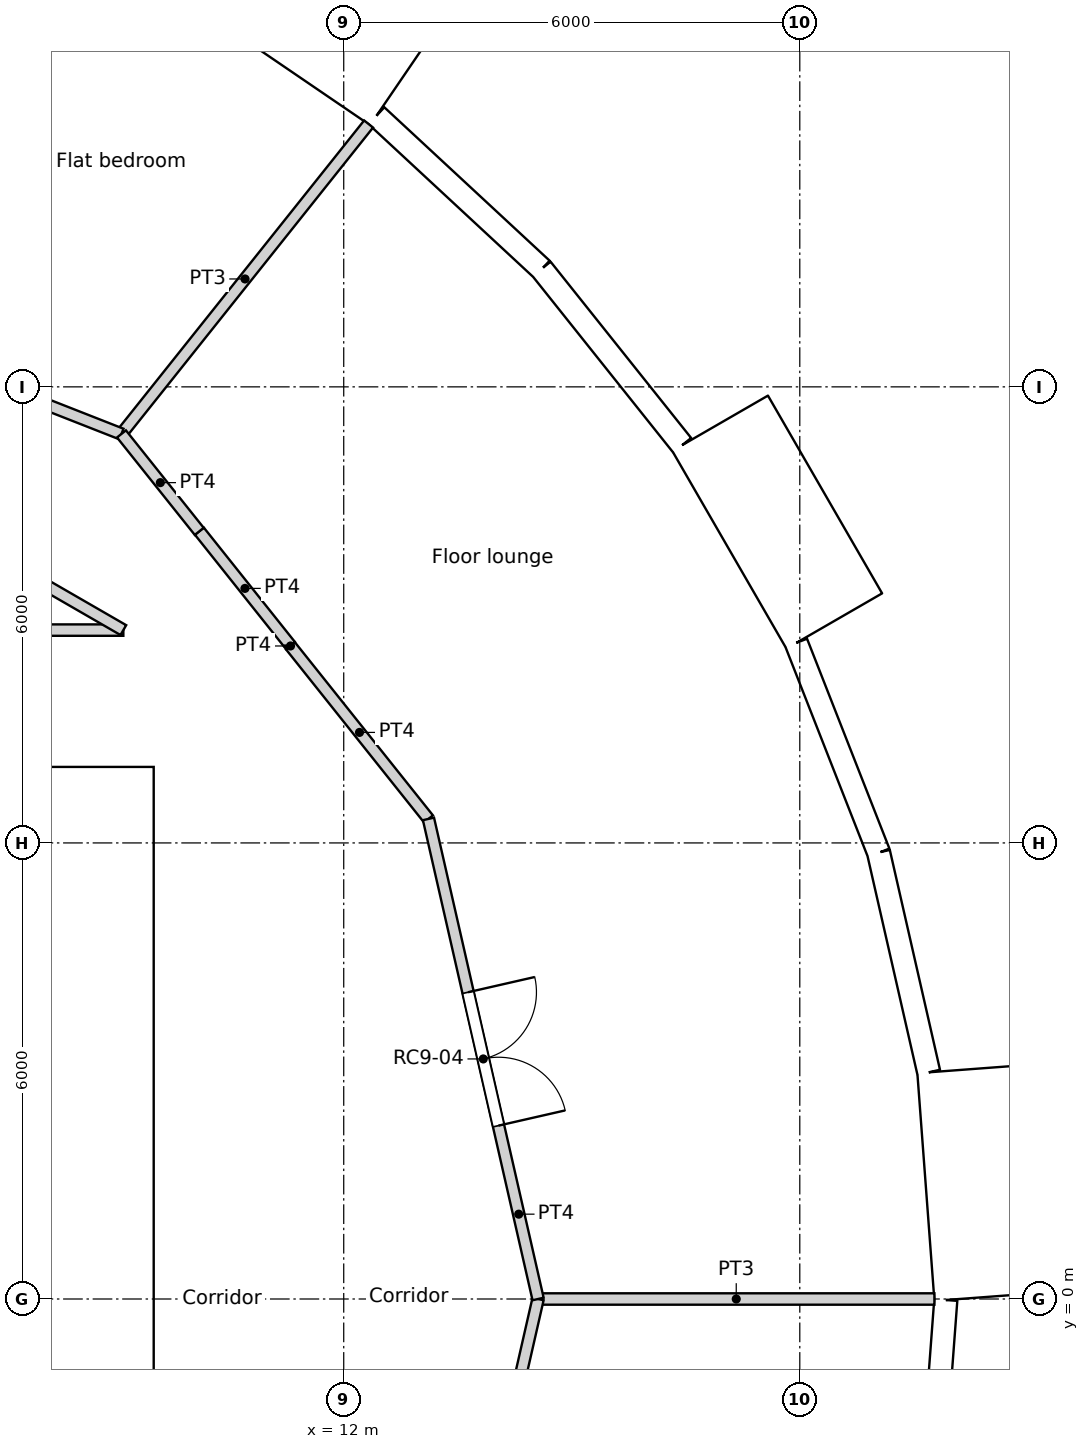
"""IFC4 building model, lengths in metres.
Left out: names, types, materials, properties, quantities, classifications, styles, units other than length and angle.
Written with IfcOpenShell. Run it as: python <this file> out.ifc"""

import sys

from ifc_helpers import new_model, si_unit, direction, frame, frame_2d, origin, origin_2d, place, context, subcontext, project, spatial, rectangle, circle, extrude, element, fill, save


model = new_model("IFC4")
c1 = context("Model", 3, precision=1e-05, world=origin(), true_north=direction((0.0, 1.0)))
c2 = subcontext(c1, "Body", "Model", "MODEL_VIEW")
j1 = project(units=[si_unit("LENGTHUNIT", "METRE"), si_unit("PLANEANGLEUNIT", "RADIAN")], contexts=[c1])
p1 = place(None, origin())
s1 = spatial("IfcSite", under=j1, at=p1, CompositionType="ELEMENT")
p2 = place(p1, origin())
s2 = spatial("IfcBuilding", under=s1, at=p2, CompositionType="ELEMENT")
p3 = place(p2, frame((0.0, 0.0, 316.2)))
s3 = spatial("IfcBuildingStorey", under=s2, at=p3, CompositionType="ELEMENT", Elevation=316.2)
for number, where, z_axis, x_axis in (
    (1, (18.822, 0.0, 0.0), (0.0, 0.0, 1.0), (1.0, 0.0, 0.0)),
    (2, (17.986, 5.548, 0.0), (0.0, 0.0, 1.0), (1.0, 0.0, 0.0)),
    (3, (15.552, 10.603, 0.0), (0.0, 0.0, 1.0), (1.0, 0.0, 0.0)),
    (4, (11.735, 14.716, 0.0), (0.0, 0.0, 1.0), (1.0, 0.0, 0.0)),
):
    element("IfcColumn", number, at=place(p3, frame(where, z_axis=z_axis, x_axis=x_axis)), inside=s3, PredefinedType="COLUMN", context=c2, shape_type="SweptSolid", body=[
        extrude(circle(Radius=0.45, at=origin_2d()), origin(), (0.0, 0.0, 1.0), 3.6),
    ])
p4 = place(p3, frame((20.496, 0.032, -0.35), z_axis=(0.0, 0.0, 1.0), x_axis=(-0.074785902127, 0.997199613339, 0.0)))
e5 = element("IfcWall", 5, at=p4, inside=s3, PredefinedType="ELEMENTEDWALL", context=c2, shape_type="SweptSolid", body=[
    extrude(rectangle(XDim=3.0, YDim=1.45, at=frame_2d((1.5, 0.0))), origin(), (0.0, 0.0, 1.0), 3.6),
])
p5 = place(p4, frame((1.5, 0.0, 1.9)))
e6 = element("IfcOpeningElement", 6, at=p5, cuts=e5, PredefinedType="OPENING", context=c2, shape_type="SweptSolid", body=[
    extrude(circle(Radius=0.9, at=origin_2d()), frame((0.0, 0.735, 0.0), z_axis=(0.0, -1.0, 0.0), x_axis=(1.0, 0.0, 0.0)), (0.0, 0.0, 1.0), 1.47),
])
p6 = place(p3, frame((19.696, 2.984, 0.0), z_axis=(0.0, 0.0, 1.0), x_axis=(-0.222529389789, 0.974925982155, 0.0)))
e7 = element("IfcWall", 7, at=p6, inside=s3, PredefinedType="SOLIDWALL", context=c2, shape_type="SweptSolid", body=[
    extrude(rectangle(XDim=2.962, YDim=0.3, at=frame_2d((1.481, 0.0))), origin(), (0.0, 0.0, 1.0), 3.25),
])
p7 = place(p6, frame((1.481, 0.0, 1.55)))
e8 = element("IfcOpeningElement", 8, at=p7, cuts=e7, PredefinedType="OPENING", context=c2, shape_type="SweptSolid", body=[
    extrude(circle(Radius=0.9, at=origin_2d()), frame((0.0, 0.16, 0.0), z_axis=(0.0, -1.0, 0.0), x_axis=(1.0, 0.0, 0.0)), (0.0, 0.0, 1.0), 0.32),
])
p8 = place(p3, frame((19.037, 5.872, 0.0), z_axis=(0.0, 0.0, 1.0), x_axis=(-0.36530043032, 0.930889679612, 0.0)))
e9 = element("IfcWall", 9, at=p8, inside=s3, PredefinedType="SOLIDWALL", context=c2, shape_type="SweptSolid", body=[
    extrude(rectangle(XDim=2.962, YDim=0.3, at=frame_2d((1.481, 0.0))), origin(), (0.0, 0.0, 1.0), 3.25),
])
p9 = place(p8, frame((1.481, 0.0, 1.55)))
e10 = element("IfcOpeningElement", 10, at=p9, cuts=e9, PredefinedType="OPENING", context=c2, shape_type="SweptSolid", body=[
    extrude(circle(Radius=0.9, at=origin_2d()), frame((0.0, 0.16, 0.0), z_axis=(0.0, -1.0, 0.0), x_axis=(1.0, 0.0, 0.0)), (0.0, 0.0, 1.0), 0.32),
])
p10 = place(p3, frame((18.452, 8.921, -0.35), z_axis=(0.0, 0.0, 1.0), x_axis=(-0.499990139034, 0.866031096941, 0.0)))
e11 = element("IfcWall", 11, at=p10, inside=s3, PredefinedType="ELEMENTEDWALL", context=c2, shape_type="SweptSolid", body=[
    extrude(rectangle(XDim=3.0, YDim=1.45, at=frame_2d((1.5, 0.0))), origin(), (0.0, 0.0, 1.0), 3.6),
])
p11 = place(p10, frame((1.5, 0.0, 1.9)))
e12 = element("IfcOpeningElement", 12, at=p11, cuts=e11, PredefinedType="OPENING", context=c2, shape_type="SweptSolid", body=[
    extrude(circle(Radius=0.9, at=origin_2d()), frame((0.0, 0.735, 0.0), z_axis=(0.0, -1.0, 0.0), x_axis=(1.0, 0.0, 0.0)), (0.0, 0.0, 1.0), 1.47),
])
p12 = place(p3, frame((16.451, 11.234, 0.0), z_axis=(0.0, 0.0, 1.0), x_axis=(-0.623498236992, 0.781824755599, 0.0)))
e13 = element("IfcWall", 13, at=p12, inside=s3, PredefinedType="SOLIDWALL", context=c2, shape_type="SweptSolid", body=[
    extrude(rectangle(XDim=2.962, YDim=0.3, at=frame_2d((1.481, 0.0))), origin(), (0.0, 0.0, 1.0), 3.25),
])
p13 = place(p12, frame((1.481, 0.0, 1.55)))
e14 = element("IfcOpeningElement", 14, at=p13, cuts=e13, PredefinedType="OPENING", context=c2, shape_type="SweptSolid", body=[
    extrude(circle(Radius=0.9, at=origin_2d()), frame((0.0, 0.16, 0.0), z_axis=(0.0, -1.0, 0.0), x_axis=(1.0, 0.0, 0.0)), (0.0, 0.0, 1.0), 0.32),
])
p14 = place(p3, frame((14.604, 13.55, 0.0), z_axis=(0.0, 0.0, 1.0), x_axis=(-0.733066412643, 0.680157066165, 0.0)))
e15 = element("IfcWall", 15, at=p14, inside=s3, PredefinedType="SOLIDWALL", context=c2, shape_type="SweptSolid", body=[
    extrude(rectangle(XDim=2.962, YDim=0.3, at=frame_2d((1.481, 0.0))), origin(), (0.0, 0.0, 1.0), 3.25),
])
p15 = place(p14, frame((1.481, 0.0, 1.55)))
e16 = element("IfcOpeningElement", 16, at=p15, cuts=e15, PredefinedType="OPENING", context=c2, shape_type="SweptSolid", body=[
    extrude(circle(Radius=0.9, at=origin_2d()), frame((0.0, 0.16, 0.0), z_axis=(0.0, -1.0, 0.0), x_axis=(1.0, 0.0, 0.0)), (0.0, 0.0, 1.0), 0.32),
])
p16 = place(p3, frame((12.754, 16.044, -0.35), z_axis=(0.0, 0.0, 1.0), x_axis=(-0.826246281157, 0.563309047392, 0.0)))
e17 = element("IfcWall", 17, at=p16, inside=s3, PredefinedType="ELEMENTEDWALL", context=c2, shape_type="SweptSolid", body=[
    extrude(rectangle(XDim=3.0, YDim=1.45, at=frame_2d((1.5, 0.0))), origin(), (0.0, 0.0, 1.0), 3.6),
])
p17 = place(p16, frame((1.5, 0.0, 1.9)))
e18 = element("IfcOpeningElement", 18, at=p17, cuts=e17, PredefinedType="OPENING", context=c2, shape_type="SweptSolid", body=[
    extrude(circle(Radius=0.9, at=origin_2d()), frame((0.0, 0.735, 0.0), z_axis=(0.0, -1.0, 0.0), x_axis=(1.0, 0.0, 0.0)), (0.0, 0.0, 1.0), 1.47),
])
p18 = place(p3, frame((19.699, -2.969, 0.0), z_axis=(0.0, 0.0, 1.0), x_axis=(0.07474897196, 0.997202382263, 0.0)))
e19 = element("IfcWall", 19, at=p18, inside=s3, PredefinedType="SOLIDWALL", context=c2, shape_type="SweptSolid", body=[
    extrude(rectangle(XDim=2.962, YDim=0.3, at=frame_2d((1.481, 0.0))), origin(), (0.0, 0.0, 1.0), 3.25),
])
p19 = place(p18, frame((1.481, 0.0, 1.55)))
e20 = element("IfcOpeningElement", 20, at=p19, cuts=e19, PredefinedType="OPENING", context=c2, shape_type="SweptSolid", body=[
    extrude(circle(Radius=0.9, at=origin_2d()), frame((0.0, 0.16, 0.0), z_axis=(0.0, -1.0, 0.0), x_axis=(1.0, 0.0, 0.0)), (0.0, 0.0, 1.0), 0.32),
])
p20 = place(p3, frame((-9.5, 6.7, 0.0), z_axis=(0.0, 0.0, 1.0), x_axis=(1.0, 0.0, 0.0)))
e21 = element("IfcWall", 21, at=p20, inside=s3, PredefinedType="SOLIDWALL", context=c2, shape_type="SweptSolid", body=[
    extrude(rectangle(XDim=19.0, YDim=0.6, at=frame_2d((9.5, 0.0))), origin(), (0.0, 0.0, 1.0), 3.6),
])
p21 = place(p20, frame((5.35, 0.0, 0.0)))
e22 = element("IfcOpeningElement", 22, at=p21, cuts=e21, PredefinedType="OPENING", context=c2, shape_type="SweptSolid", body=[
    extrude(rectangle(XDim=1.7, YDim=2.1, at=frame_2d((0.85, 1.05))), frame((0.0, 0.3, 0.0), z_axis=(0.0, -1.0, 0.0), x_axis=(1.0, 0.0, 0.0)), (0.0, 0.0, 1.0), 0.6),
])
p22 = place(p3, frame((9.2, -6.4, 0.0), z_axis=(0.0, 0.0, 1.0), x_axis=(0.0, 1.0, 0.0)))
e23 = element("IfcWall", 23, at=p22, inside=s3, PredefinedType="SOLIDWALL", context=c2, shape_type="SweptSolid", body=[
    extrude(rectangle(XDim=12.8, YDim=0.6, at=frame_2d((6.4, 0.0))), origin(), (0.0, 0.0, 1.0), 3.6),
])
p23 = place(p22, frame((6.4, 0.0, 0.0)))
e24 = element("IfcOpeningElement", 24, at=p23, cuts=e23, PredefinedType="OPENING", context=c2, shape_type="SweptSolid", body=[
    extrude(rectangle(XDim=1.8, YDim=2.1, at=frame_2d((0.9, 1.05))), frame((0.0, 0.3, 0.0), z_axis=(0.0, -1.0, 0.0), x_axis=(1.0, 0.0, 0.0)), (0.0, 0.0, 1.0), 0.6),
])
p24 = place(p3, frame((-4.35, 3.1, 0.0), z_axis=(0.0, 0.0, 1.0), x_axis=(1.0, 0.0, 0.0)))
e25 = element("IfcWall", 25, at=p24, inside=s3, PredefinedType="SOLIDWALL", context=c2, shape_type="SweptSolid", body=[
    extrude(rectangle(XDim=13.25, YDim=0.3, at=frame_2d((6.625, 0.0))), origin(), (0.0, 0.0, 1.0), 3.25),
])
p25 = place(p24, frame((2.95, 0.0, 0.0)))
e26 = element("IfcOpeningElement", 26, at=p25, cuts=e25, PredefinedType="OPENING", context=c2, shape_type="SweptSolid", body=[
    extrude(rectangle(XDim=1.1, YDim=2.1, at=frame_2d((0.55, 1.05))), frame((0.0, 0.15, 0.0), z_axis=(0.0, -1.0, 0.0), x_axis=(1.0, 0.0, 0.0)), (0.0, 0.0, 1.0), 0.3),
])
p26 = place(p24, frame((5.75, 0.0, 0.0)))
e27 = element("IfcOpeningElement", 27, at=p26, cuts=e25, PredefinedType="OPENING", context=c2, shape_type="SweptSolid", body=[
    extrude(rectangle(XDim=1.1, YDim=2.1, at=frame_2d((0.55, 1.05))), frame((0.0, 0.15, 0.0), z_axis=(0.0, -1.0, 0.0), x_axis=(1.0, 0.0, 0.0)), (0.0, 0.0, 1.0), 0.3),
])
p27 = place(p24, frame((8.55, 0.0, 0.0)))
e28 = element("IfcOpeningElement", 28, at=p27, cuts=e25, PredefinedType="OPENING", context=c2, shape_type="SweptSolid", body=[
    extrude(rectangle(XDim=1.1, YDim=2.1, at=frame_2d((0.55, 1.05))), frame((0.0, 0.15, 0.0), z_axis=(0.0, -1.0, 0.0), x_axis=(1.0, 0.0, 0.0)), (0.0, 0.0, 1.0), 0.3),
])
p28 = place(p3, frame((-9.092, 8.8, 0.0), z_axis=(0.0, 0.0, 1.0), x_axis=(1.0, 0.0, 0.0)))
e29 = element("IfcWall", 29, at=p28, inside=s3, PredefinedType="PARTITIONING", context=c2, shape_type="SweptSolid", body=[
    extrude(rectangle(XDim=18.193, YDim=0.15, at=frame_2d((9.096, 0.0))), origin(), (0.0, 0.0, 1.0), 3.25),
])
p29 = place(p28, frame((8.592, 0.0, 0.0)))
e30 = element("IfcOpeningElement", 30, at=p29, cuts=e29, PredefinedType="OPENING", context=c2, shape_type="SweptSolid", body=[
    extrude(rectangle(XDim=1.0, YDim=2.04, at=frame_2d((0.5, 1.02))), frame((0.0, 0.075, 0.0), z_axis=(0.0, -1.0, 0.0), x_axis=(1.0, 0.0, 0.0)), (0.0, 0.0, 1.0), 0.15),
])
p30 = place(p3, frame((10.101, 10.101, 0.0), z_axis=(0.0, 0.0, 1.0), x_axis=(0.623130947784, -0.782117524362, 0.0)))
e31 = element("IfcWall", 31, at=p30, inside=s3, PredefinedType="PARTITIONING", context=c2, shape_type="SweptSolid", body=[
    extrude(rectangle(XDim=1.924, YDim=0.15, at=frame_2d((0.962, 0.0))), origin(), (0.0, 0.0, 1.0), 3.25),
])
p31 = place(p3, frame((11.3, 8.586, 0.0), z_axis=(0.0, 0.0, 1.0), x_axis=(0.0, 1.0, 0.0)))
e32 = element("IfcWall", 32, at=p31, inside=s3, PredefinedType="PARTITIONING", context=c2, shape_type="SweptSolid", body=[
    extrude(rectangle(XDim=0.01, YDim=0.15, at=frame_2d((0.005, 0.0))), origin(), (0.0, 0.0, 1.0), 3.25),
])
p32 = place(p3, frame((11.3, 8.592, 0.0), z_axis=(0.0, 0.0, 1.0), x_axis=(0.623446514299, -0.781866001185, 0.0)))
e33 = element("IfcWall", 33, at=p32, inside=s3, PredefinedType="PARTITIONING", context=c2, shape_type="SweptSolid", body=[
    extrude(rectangle(XDim=2.911, YDim=0.15, at=frame_2d((1.456, 0.0))), origin(), (0.0, 0.0, 1.0), 3.25),
])
p33 = place(p3, frame((13.115, 6.316, 0.0), z_axis=(0.0, 0.0, 1.0), x_axis=(0.222568978642, -0.97491694505, 0.0)))
e34 = element("IfcWall", 34, at=p33, inside=s3, PredefinedType="PARTITIONING", context=c2, shape_type="SweptSolid", body=[
    extrude(rectangle(XDim=6.479, YDim=0.15, at=frame_2d((3.239, 0.0))), origin(), (0.0, 0.0, 1.0), 3.25),
])
p34 = place(p33, frame((2.339, 0.0, 0.0)))
e35 = element("IfcOpeningElement", 35, at=p34, cuts=e34, PredefinedType="OPENING", context=c2, shape_type="SweptSolid", body=[
    extrude(rectangle(XDim=1.8, YDim=2.1, at=frame_2d((0.9, 1.05))), frame((0.0, 0.075, 0.0), z_axis=(0.0, -1.0, 0.0), x_axis=(1.0, 0.0, 0.0)), (0.0, 0.0, 1.0), 0.15),
])
p35 = place(p3, frame((13.115, -6.316, 0.0), z_axis=(0.0, 0.0, 1.0), x_axis=(0.222533159771, 0.974925121639, 0.0)))
e36 = element("IfcWall", 36, at=p35, inside=s3, PredefinedType="PARTITIONING", context=c2, shape_type="SweptSolid", body=[
    extrude(rectangle(XDim=6.478, YDim=0.15, at=frame_2d((3.239, 0.0))), origin(), (0.0, 0.0, 1.0), 3.25),
])
p36 = place(p35, frame((3.824, 0.0, 0.0)))
e37 = element("IfcOpeningElement", 37, at=p36, cuts=e36, PredefinedType="OPENING", context=c2, shape_type="SweptSolid", body=[
    extrude(rectangle(XDim=1.0, YDim=2.04, at=frame_2d((0.5, 1.02))), frame((0.0, 0.075, 0.0), z_axis=(0.0, -1.0, 0.0), x_axis=(1.0, 0.0, 0.0)), (0.0, 0.0, 1.0), 0.15),
])
p37 = place(p3, frame((3.261, 12.171, 0.0), z_axis=(0.0, 0.0, 1.0), x_axis=(0.866066809554, -0.499928276245, 0.0)))
e38 = element("IfcWall", 38, at=p37, inside=s3, PredefinedType="PARTITIONING", context=c2, shape_type="SweptSolid", body=[
    extrude(rectangle(XDim=6.743, YDim=0.15, at=frame_2d((3.371, 0.0))), origin(), (0.0, 0.0, 1.0), 3.25),
])
p38 = place(p3, frame((9.076, 11.381, 0.0), z_axis=(0.0, 0.0, 1.0), x_axis=(0.623805208652, -0.781579849829, 0.0)))
e39 = element("IfcWall", 39, at=p38, inside=s3, PredefinedType="PARTITIONING", context=c2, shape_type="SweptSolid", body=[
    extrude(rectangle(XDim=1.64, YDim=0.15, at=frame_2d((0.82, 0.0))), origin(), (0.0, 0.0, 1.0), 3.25),
])
p39 = place(p3, frame((1.088, 14.516, 0.0), z_axis=(0.0, 0.0, 1.0), x_axis=(0.930800934608, -0.365526497168, 0.0)))
e40 = element("IfcWall", 40, at=p39, inside=s3, PredefinedType="PARTITIONING", context=c2, shape_type="SweptSolid", body=[
    extrude(rectangle(XDim=8.581, YDim=0.15, at=frame_2d((4.291, 0.0))), origin(), (0.0, 0.0, 1.0), 3.25),
])
p40 = place(p39, frame((0.864, 0.0, 0.0)))
e41 = element("IfcOpeningElement", 41, at=p40, cuts=e40, PredefinedType="OPENING", context=c2, shape_type="SweptSolid", body=[
    extrude(rectangle(XDim=1.0, YDim=2.1, at=frame_2d((0.5, 1.05))), frame((0.0, 0.075, 0.0), z_axis=(0.0, -1.0, 0.0), x_axis=(1.0, 0.0, 0.0)), (0.0, 0.0, 1.0), 0.15),
])
p41 = place(p3, frame((9.076, 11.381, 0.0), z_axis=(0.0, 0.0, 1.0), x_axis=(0.623460949534, 0.781854490558, 0.0)))
e42 = element("IfcWall", 42, at=p41, inside=s3, PredefinedType="PARTITIONING", context=c2, shape_type="SweptSolid", body=[
    extrude(rectangle(XDim=5.214, YDim=0.15, at=frame_2d((2.607, 0.0))), origin(), (0.0, 0.0, 1.0), 3.25),
])
p42 = place(p3, frame((14.557, 0.0, 0.0), z_axis=(0.0, 0.0, 1.0), x_axis=(1.0, 0.0, 0.0)))
e43 = element("IfcWall", 43, at=p42, inside=s3, PredefinedType="PARTITIONING", context=c2, shape_type="SweptSolid", body=[
    extrude(rectangle(XDim=5.214, YDim=0.15, at=frame_2d((2.607, 0.0))), origin(), (0.0, 0.0, 1.0), 3.25),
])
p43 = place(p5, origin())
e44 = element("IfcWindow", 44, at=p43, inside=s3, PartitioningType="SINGLE_PANEL", PredefinedType="WINDOW", context=c2, shape_type="SweptSolid", body=[
    extrude(circle(Radius=0.9, at=origin_2d()), frame((0.0, 0.695, 0.0), z_axis=(0.0, -1.0, 0.0), x_axis=(1.0, 0.0, 0.0)), (0.0, 0.0, 1.0), 0.1),
])
fill(e6, e44)
p44 = place(p7, origin())
e45 = element("IfcWindow", 45, at=p44, inside=s3, PartitioningType="SINGLE_PANEL", PredefinedType="WINDOW", context=c2, shape_type="SweptSolid", body=[
    extrude(circle(Radius=0.9, at=origin_2d()), frame((0.0, 0.12, 0.0), z_axis=(0.0, -1.0, 0.0), x_axis=(1.0, 0.0, 0.0)), (0.0, 0.0, 1.0), 0.1),
])
fill(e8, e45)
p45 = place(p9, origin())
e46 = element("IfcWindow", 46, at=p45, inside=s3, PartitioningType="SINGLE_PANEL", PredefinedType="WINDOW", context=c2, shape_type="SweptSolid", body=[
    extrude(circle(Radius=0.9, at=origin_2d()), frame((0.0, 0.12, 0.0), z_axis=(0.0, -1.0, 0.0), x_axis=(1.0, 0.0, 0.0)), (0.0, 0.0, 1.0), 0.1),
])
fill(e10, e46)
p46 = place(p11, origin())
e47 = element("IfcWindow", 47, at=p46, inside=s3, PartitioningType="SINGLE_PANEL", PredefinedType="WINDOW", context=c2, shape_type="SweptSolid", body=[
    extrude(circle(Radius=0.9, at=origin_2d()), frame((0.0, 0.695, 0.0), z_axis=(0.0, -1.0, 0.0), x_axis=(1.0, 0.0, 0.0)), (0.0, 0.0, 1.0), 0.1),
])
fill(e12, e47)
p47 = place(p13, origin())
e48 = element("IfcWindow", 48, at=p47, inside=s3, PartitioningType="SINGLE_PANEL", PredefinedType="WINDOW", context=c2, shape_type="SweptSolid", body=[
    extrude(circle(Radius=0.9, at=origin_2d()), frame((0.0, 0.12, 0.0), z_axis=(0.0, -1.0, 0.0), x_axis=(1.0, 0.0, 0.0)), (0.0, 0.0, 1.0), 0.1),
])
fill(e14, e48)
p48 = place(p15, origin())
e49 = element("IfcWindow", 49, at=p48, inside=s3, PartitioningType="SINGLE_PANEL", PredefinedType="WINDOW", context=c2, shape_type="SweptSolid", body=[
    extrude(circle(Radius=0.9, at=origin_2d()), frame((0.0, 0.12, 0.0), z_axis=(0.0, -1.0, 0.0), x_axis=(1.0, 0.0, 0.0)), (0.0, 0.0, 1.0), 0.1),
])
fill(e16, e49)
p49 = place(p17, origin())
e50 = element("IfcWindow", 50, at=p49, inside=s3, PartitioningType="SINGLE_PANEL", PredefinedType="WINDOW", context=c2, shape_type="SweptSolid", body=[
    extrude(circle(Radius=0.9, at=origin_2d()), frame((0.0, 0.695, 0.0), z_axis=(0.0, -1.0, 0.0), x_axis=(1.0, 0.0, 0.0)), (0.0, 0.0, 1.0), 0.1),
])
fill(e18, e50)
p50 = place(p19, origin())
e51 = element("IfcWindow", 51, at=p50, inside=s3, PartitioningType="SINGLE_PANEL", PredefinedType="WINDOW", context=c2, shape_type="SweptSolid", body=[
    extrude(circle(Radius=0.9, at=origin_2d()), frame((0.0, 0.12, 0.0), z_axis=(0.0, -1.0, 0.0), x_axis=(1.0, 0.0, 0.0)), (0.0, 0.0, 1.0), 0.1),
])
fill(e20, e51)
p51 = place(p23, origin())
e52 = element("IfcDoor", 52, at=p51, inside=s3, OperationType="DOUBLE_DOOR_SINGLE_SWING", PredefinedType="DOOR", context=c2, shape_type="SweptSolid", body=[
    extrude(rectangle(XDim=1.8, YDim=2.1, at=frame_2d((0.9, 1.05))), frame((0.0, 0.025, 0.0), z_axis=(0.0, -1.0, 0.0), x_axis=(1.0, 0.0, 0.0)), (0.0, 0.0, 1.0), 0.05),
])
fill(e24, e52)
p52 = place(p34, origin())
e53 = element("IfcDoor", 53, at=p52, inside=s3, OperationType="DOUBLE_DOOR_SINGLE_SWING", PredefinedType="DOOR", context=c2, shape_type="SweptSolid", body=[
    extrude(rectangle(XDim=1.8, YDim=2.1, at=frame_2d((0.9, 1.05))), frame((0.0, 0.025, 0.0), z_axis=(0.0, -1.0, 0.0), x_axis=(1.0, 0.0, 0.0)), (0.0, 0.0, 1.0), 0.05),
])
fill(e35, e53)
save(model, sys.argv[1])
